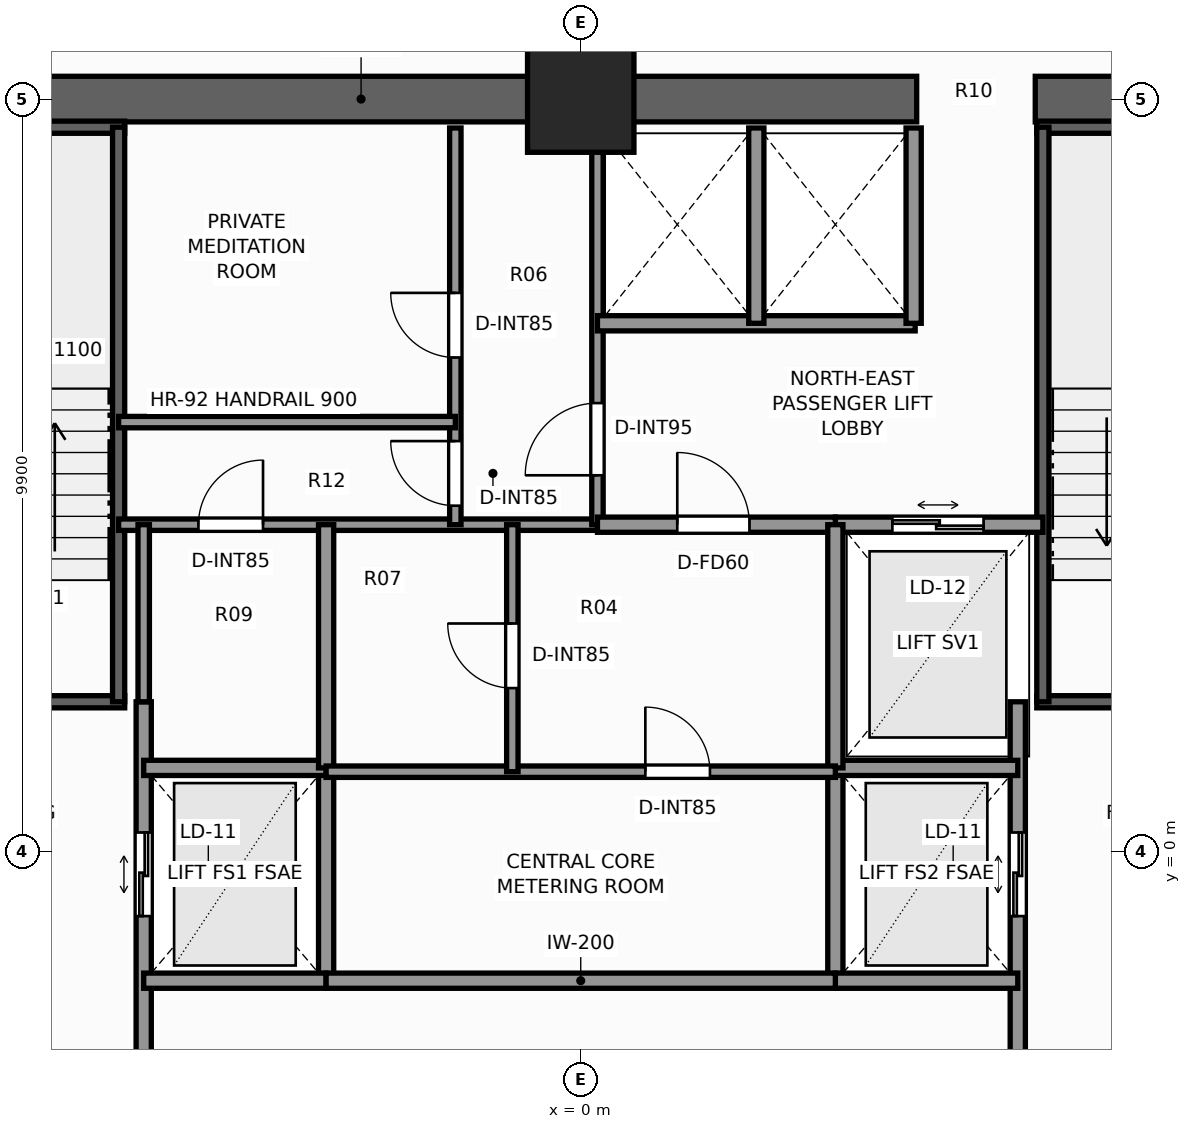
"""IFC4 building model, lengths in metres.
Left out: names, types, materials, properties, quantities, classifications, styles, units other than length and angle.
Written with IfcOpenShell. Run it as: python <this file> out.ifc"""

import sys

from ifc_helpers import new_model, si_unit, direction, frame, frame_2d, origin, origin_2d, place, context, subcontext, project, spatial, rectangle, extrude, element, fill, save


model = new_model("IFC4")
c1 = context("Model", 3, precision=1e-05, world=origin(), true_north=direction((0.0, 1.0)))
c2 = subcontext(c1, "Body", "Model", "MODEL_VIEW")
j1 = project(units=[si_unit("LENGTHUNIT", "METRE"), si_unit("PLANEANGLEUNIT", "RADIAN")], contexts=[c1])
p1 = place(None, origin())
s1 = spatial("IfcSite", under=j1, at=p1, CompositionType="ELEMENT")
p2 = place(p1, origin())
s2 = spatial("IfcBuilding", under=s1, at=p2, CompositionType="ELEMENT")
p3 = place(p2, frame((0.0, 0.0, 82.1)))
s3 = spatial("IfcBuildingStorey", under=s2, at=p3, CompositionType="ELEMENT", Elevation=82.1)
p4 = place(p3, frame((-10.2, 9.9, 0.0), z_axis=(0.0, 0.0, 1.0), x_axis=(1.0, 0.0, 0.0)))
e1 = element("IfcWall", 1, at=p4, inside=s3, PredefinedType="SHEAR", context=c2, shape_type="SweptSolid", body=[
    extrude(rectangle(XDim=14.62, YDim=0.6, at=frame_2d((7.31, 0.0))), origin(), (0.0, 0.0, 1.0), 3.3),
])
p5 = place(p3, frame((5.98, 9.9, 0.0), z_axis=(0.0, 0.0, 1.0), x_axis=(1.0, 0.0, 0.0)))
e2 = element("IfcWall", 2, at=p5, inside=s3, PredefinedType="SHEAR", context=c2, shape_type="SweptSolid", body=[
    extrude(rectangle(XDim=4.22, YDim=0.6, at=frame_2d((2.11, 0.0))), origin(), (0.0, 0.0, 1.0), 3.3),
])
p6 = place(p3, frame((0.0, 9.9, 0.0), z_axis=(0.0, 0.0, 1.0), x_axis=(1.0, 0.0, 0.0)))
e3 = element("IfcColumn", 3, at=p6, inside=s3, PredefinedType="COLUMN", context=c2, shape_type="SweptSolid", body=[
    extrude(rectangle(XDim=1.4, YDim=1.4, at=origin_2d()), origin(), (0.0, 0.0, 1.0), 3.3),
])
p7 = place(p3, frame((-9.52, 1.97, 0.0), z_axis=(0.0, 0.0, 1.0), x_axis=(1.0, 0.0, 0.0)))
e4 = element("IfcWall", 4, at=p7, inside=s3, PredefinedType="SHEAR", context=c2, shape_type="SweptSolid", body=[
    extrude(rectangle(XDim=3.52, YDim=0.16, at=frame_2d((1.76, 0.0))), origin(), (0.0, 0.0, 1.0), 3.3),
])
p8 = place(p7, frame((1.15, 0.0, 0.0)))
e5 = element("IfcOpeningElement", 5, at=p8, cuts=e4, PredefinedType="OPENING", context=c2, shape_type="SweptSolid", body=[
    extrude(rectangle(XDim=1.1, YDim=2.2, at=frame_2d((0.55, 1.1))), frame((0.0, 0.09, 0.0), z_axis=(0.0, -1.0, 0.0), x_axis=(1.0, 0.0, 0.0)), (0.0, 0.0, 1.0), 0.18),
])
p9 = place(p3, frame((-9.52, 9.53, 0.0), z_axis=(0.0, 0.0, 1.0), x_axis=(1.0, 0.0, 0.0)))
e6 = element("IfcWall", 6, at=p9, inside=s3, PredefinedType="SHEAR", context=c2, shape_type="SweptSolid", body=[
    extrude(rectangle(XDim=3.52, YDim=0.16, at=frame_2d((1.76, 0.0))), origin(), (0.0, 0.0, 1.0), 3.3),
])
p10 = place(p3, frame((-6.08, 1.97, 0.0), z_axis=(0.0, 0.0, 1.0), x_axis=(0.0, 1.0, 0.0)))
e7 = element("IfcWall", 7, at=p10, inside=s3, PredefinedType="SHEAR", context=c2, shape_type="SweptSolid", body=[
    extrude(rectangle(XDim=7.56, YDim=0.16, at=frame_2d((3.78, 0.0))), origin(), (0.0, 0.0, 1.0), 3.3),
])
p11 = place(p3, frame((6.0, 1.97, 0.0), z_axis=(0.0, 0.0, 1.0), x_axis=(1.0, 0.0, 0.0)))
e8 = element("IfcWall", 8, at=p11, inside=s3, PredefinedType="SHEAR", context=c2, shape_type="SweptSolid", body=[
    extrude(rectangle(XDim=3.52, YDim=0.16, at=frame_2d((1.76, 0.0))), origin(), (0.0, 0.0, 1.0), 3.3),
])
p12 = place(p11, frame((1.15, 0.0, 0.0)))
e9 = element("IfcOpeningElement", 9, at=p12, cuts=e8, PredefinedType="OPENING", context=c2, shape_type="SweptSolid", body=[
    extrude(rectangle(XDim=1.1, YDim=2.2, at=frame_2d((0.55, 1.1))), frame((0.0, 0.09, 0.0), z_axis=(0.0, -1.0, 0.0), x_axis=(1.0, 0.0, 0.0)), (0.0, 0.0, 1.0), 0.18),
])
p13 = place(p3, frame((6.0, 9.53, 0.0), z_axis=(0.0, 0.0, 1.0), x_axis=(1.0, 0.0, 0.0)))
e10 = element("IfcWall", 10, at=p13, inside=s3, PredefinedType="SHEAR", context=c2, shape_type="SweptSolid", body=[
    extrude(rectangle(XDim=3.52, YDim=0.16, at=frame_2d((1.76, 0.0))), origin(), (0.0, 0.0, 1.0), 3.3),
])
p14 = place(p3, frame((6.08, 1.97, 0.0), z_axis=(0.0, 0.0, 1.0), x_axis=(0.0, 1.0, 0.0)))
e11 = element("IfcWall", 11, at=p14, inside=s3, PredefinedType="SHEAR", context=c2, shape_type="SweptSolid", body=[
    extrude(rectangle(XDim=7.56, YDim=0.16, at=frame_2d((3.78, 0.0))), origin(), (0.0, 0.0, 1.0), 3.3),
])
p15 = place(p3, frame((-5.75, -3.6, 0.0), z_axis=(0.0, 0.0, 1.0), x_axis=(0.0, 1.0, 0.0)))
e12 = element("IfcWall", 12, at=p15, inside=s3, PredefinedType="SOLIDWALL", context=c2, shape_type="SweptSolid", body=[
    extrude(rectangle(XDim=5.57, YDim=0.2, at=frame_2d((2.785, 0.0))), origin(), (0.0, 0.0, 1.0), 3.08),
])
p16 = place(p15, frame((2.75, 0.0, 0.0)))
e13 = element("IfcOpeningElement", 13, at=p16, cuts=e12, PredefinedType="OPENING", context=c2, shape_type="SweptSolid", body=[
    extrude(rectangle(XDim=1.1, YDim=2.2, at=frame_2d((0.55, 1.1))), frame((0.0, 0.11, 0.0), z_axis=(0.0, -1.0, 0.0), x_axis=(1.0, 0.0, 0.0)), (0.0, 0.0, 1.0), 0.22),
])
p17 = place(p3, frame((-3.35, -1.7, 0.0), z_axis=(0.0, 0.0, 1.0), x_axis=(0.0, 1.0, 0.0)))
e14 = element("IfcWall", 14, at=p17, inside=s3, PredefinedType="SOLIDWALL", context=c2, shape_type="SweptSolid", body=[
    extrude(rectangle(XDim=2.8, YDim=0.2, at=frame_2d((1.4, 0.0))), origin(), (0.0, 0.0, 1.0), 3.08),
])
for number, where, z_axis, x_axis in (
    (15, (-5.75, -1.7, 0.0), (0.0, 0.0, 1.0), (1.0, 0.0, 0.0)),
    (16, (-5.75, 1.1, 0.0), (0.0, 0.0, 1.0), (1.0, 0.0, 0.0)),
):
    element("IfcWall", number, at=place(p3, frame(where, z_axis=z_axis, x_axis=x_axis)), inside=s3, PredefinedType="SOLIDWALL", context=c2, shape_type="SweptSolid", body=[
        extrude(rectangle(XDim=2.4, YDim=0.2, at=frame_2d((1.2, 0.0))), origin(), (0.0, 0.0, 1.0), 3.08),
    ])
p18 = place(p3, frame((5.75, -3.6, 0.0), z_axis=(0.0, 0.0, 1.0), x_axis=(0.0, 1.0, 0.0)))
e17 = element("IfcWall", 17, at=p18, inside=s3, PredefinedType="SOLIDWALL", context=c2, shape_type="SweptSolid", body=[
    extrude(rectangle(XDim=5.57, YDim=0.2, at=frame_2d((2.785, 0.0))), origin(), (0.0, 0.0, 1.0), 3.08),
])
p19 = place(p18, frame((2.75, 0.0, 0.0)))
e18 = element("IfcOpeningElement", 18, at=p19, cuts=e17, PredefinedType="OPENING", context=c2, shape_type="SweptSolid", body=[
    extrude(rectangle(XDim=1.1, YDim=2.2, at=frame_2d((0.55, 1.1))), frame((0.0, 0.11, 0.0), z_axis=(0.0, -1.0, 0.0), x_axis=(1.0, 0.0, 0.0)), (0.0, 0.0, 1.0), 0.22),
])
p20 = place(p3, frame((3.35, -1.7, 0.0), z_axis=(0.0, 0.0, 1.0), x_axis=(0.0, 1.0, 0.0)))
e19 = element("IfcWall", 19, at=p20, inside=s3, PredefinedType="SOLIDWALL", context=c2, shape_type="SweptSolid", body=[
    extrude(rectangle(XDim=2.8, YDim=0.2, at=frame_2d((1.4, 0.0))), origin(), (0.0, 0.0, 1.0), 3.08),
])
for number, where, z_axis, x_axis in (
    (20, (3.35, -1.7, 0.0), (0.0, 0.0, 1.0), (1.0, 0.0, 0.0)),
    (21, (3.35, 1.1, 0.0), (0.0, 0.0, 1.0), (1.0, 0.0, 0.0)),
):
    element("IfcWall", number, at=place(p3, frame(where, z_axis=z_axis, x_axis=x_axis)), inside=s3, PredefinedType="SOLIDWALL", context=c2, shape_type="SweptSolid", body=[
        extrude(rectangle(XDim=2.4, YDim=0.2, at=frame_2d((1.2, 0.0))), origin(), (0.0, 0.0, 1.0), 3.08),
    ])
p21 = place(p3, frame((3.35, 4.3, 0.0), z_axis=(0.0, 0.0, 1.0), x_axis=(1.0, 0.0, 0.0)))
e22 = element("IfcWall", 22, at=p21, inside=s3, PredefinedType="SOLIDWALL", context=c2, shape_type="SweptSolid", body=[
    extrude(rectangle(XDim=2.73, YDim=0.2, at=frame_2d((1.365, 0.0))), origin(), (0.0, 0.0, 1.0), 3.08),
])
p22 = place(p21, frame((0.75, 0.0, 0.0)))
e23 = element("IfcOpeningElement", 23, at=p22, cuts=e22, PredefinedType="OPENING", context=c2, shape_type="SweptSolid", body=[
    extrude(rectangle(XDim=1.2, YDim=2.25, at=frame_2d((0.6, 1.125))), frame((0.0, 0.11, 0.0), z_axis=(0.0, -1.0, 0.0), x_axis=(1.0, 0.0, 0.0)), (0.0, 0.0, 1.0), 0.22),
])
p23 = place(p3, frame((-6.08, 4.3, 0.0), z_axis=(0.0, 0.0, 1.0), x_axis=(1.0, 0.0, 0.0)))
e24 = element("IfcWall", 24, at=p23, inside=s3, PredefinedType="PARTITIONING", context=c2, shape_type="SweptSolid", body=[
    extrude(rectangle(XDim=6.3, YDim=0.15, at=frame_2d((3.15, 0.0))), origin(), (0.0, 0.0, 1.0), 3.08),
])
p24 = place(p23, frame((1.05, 0.0, 0.0)))
e25 = element("IfcOpeningElement", 25, at=p24, cuts=e24, PredefinedType="OPENING", context=c2, shape_type="SweptSolid", body=[
    extrude(rectangle(XDim=0.85, YDim=2.03, at=frame_2d((0.425, 1.015))), frame((0.0, 0.085, 0.0), z_axis=(0.0, -1.0, 0.0), x_axis=(1.0, 0.0, 0.0)), (0.0, 0.0, 1.0), 0.17),
])
p25 = place(p3, frame((0.22, 4.3, 0.0), z_axis=(0.0, 0.0, 1.0), x_axis=(0.0, 1.0, 0.0)))
e26 = element("IfcWall", 26, at=p25, inside=s3, PredefinedType="PARTITIONING", context=c2, shape_type="SweptSolid", body=[
    extrude(rectangle(XDim=5.22, YDim=0.15, at=frame_2d((2.61, 0.0))), origin(), (0.0, 0.0, 1.0), 3.08),
])
p26 = place(p25, frame((0.65, 0.0, 0.0)))
e27 = element("IfcOpeningElement", 27, at=p26, cuts=e26, PredefinedType="OPENING", context=c2, shape_type="SweptSolid", body=[
    extrude(rectangle(XDim=0.95, YDim=2.06, at=frame_2d((0.475, 1.03))), frame((0.0, 0.085, 0.0), z_axis=(0.0, -1.0, 0.0), x_axis=(1.0, 0.0, 0.0)), (0.0, 0.0, 1.0), 0.17),
])
p27 = place(p3, frame((-1.65, 4.3, 0.0), z_axis=(0.0, 0.0, 1.0), x_axis=(0.0, 1.0, 0.0)))
e28 = element("IfcWall", 28, at=p27, inside=s3, PredefinedType="PARTITIONING", context=c2, shape_type="SweptSolid", body=[
    extrude(rectangle(XDim=5.22, YDim=0.15, at=frame_2d((2.61, 0.0))), origin(), (0.0, 0.0, 1.0), 3.08),
])
p28 = place(p27, frame((2.2, 0.0, 0.0)))
e29 = element("IfcOpeningElement", 29, at=p28, cuts=e28, PredefinedType="OPENING", context=c2, shape_type="SweptSolid", body=[
    extrude(rectangle(XDim=0.85, YDim=2.03, at=frame_2d((0.425, 1.015))), frame((0.0, 0.085, 0.0), z_axis=(0.0, -1.0, 0.0), x_axis=(1.0, 0.0, 0.0)), (0.0, 0.0, 1.0), 0.17),
])
p29 = place(p27, frame((0.25, 0.0, 0.0)))
e30 = element("IfcOpeningElement", 30, at=p29, cuts=e28, PredefinedType="OPENING", context=c2, shape_type="SweptSolid", body=[
    extrude(rectangle(XDim=0.85, YDim=2.03, at=frame_2d((0.425, 1.015))), frame((0.0, 0.085, 0.0), z_axis=(0.0, -1.0, 0.0), x_axis=(1.0, 0.0, 0.0)), (0.0, 0.0, 1.0), 0.17),
])
p30 = place(p3, frame((-6.08, 5.65, 0.0), z_axis=(0.0, 0.0, 1.0), x_axis=(1.0, 0.0, 0.0)))
e31 = element("IfcWall", 31, at=p30, inside=s3, PredefinedType="PARTITIONING", context=c2, shape_type="SweptSolid", body=[
    extrude(rectangle(XDim=4.43, YDim=0.15, at=frame_2d((2.215, 0.0))), origin(), (0.0, 0.0, 1.0), 3.08),
])
p31 = place(p3, frame((0.22, 6.95, 0.0), z_axis=(0.0, 0.0, 1.0), x_axis=(1.0, 0.0, 0.0)))
e32 = element("IfcWall", 32, at=p31, inside=s3, PredefinedType="SOLIDWALL", context=c2, shape_type="SweptSolid", body=[
    extrude(rectangle(XDim=4.18, YDim=0.2, at=frame_2d((2.09, 0.0))), origin(), (0.0, 0.0, 1.0), 3.08),
])
for number, where, z_axis, x_axis in (
    (33, (4.38, 6.95, 0.0), (0.0, 0.0, 1.0), (0.0, 1.0, 0.0)),
    (34, (2.31, 6.95, 0.0), (0.0, 0.0, 1.0), (0.0, 1.0, 0.0)),
):
    element("IfcWall", number, at=place(p3, frame(where, z_axis=z_axis, x_axis=x_axis)), inside=s3, PredefinedType="SOLIDWALL", context=c2, shape_type="SweptSolid", body=[
        extrude(rectangle(XDim=2.57, YDim=0.2, at=frame_2d((1.285, 0.0))), origin(), (0.0, 0.0, 1.0), 3.08),
    ])
p32 = place(p3, frame((0.22, 4.3, 0.0), z_axis=(0.0, 0.0, 1.0), x_axis=(1.0, 0.0, 0.0)))
e35 = element("IfcWall", 35, at=p32, inside=s3, PredefinedType="SOLIDWALL", context=c2, shape_type="SweptSolid", body=[
    extrude(rectangle(XDim=3.13, YDim=0.2, at=frame_2d((1.565, 0.0))), origin(), (0.0, 0.0, 1.0), 3.08),
])
p33 = place(p32, frame((1.05, 0.0, 0.0)))
e36 = element("IfcOpeningElement", 36, at=p33, cuts=e35, PredefinedType="OPENING", context=c2, shape_type="SweptSolid", body=[
    extrude(rectangle(XDim=0.95, YDim=2.06, at=frame_2d((0.475, 1.03))), frame((0.0, 0.11, 0.0), z_axis=(0.0, -1.0, 0.0), x_axis=(1.0, 0.0, 0.0)), (0.0, 0.0, 1.0), 0.22),
])
p34 = place(p3, frame((-3.35, -1.7, 0.0), z_axis=(0.0, 0.0, 1.0), x_axis=(1.0, 0.0, 0.0)))
e37 = element("IfcWall", 37, at=p34, inside=s3, PredefinedType="SOLIDWALL", context=c2, shape_type="SweptSolid", body=[
    extrude(rectangle(XDim=6.7, YDim=0.2, at=frame_2d((3.35, 0.0))), origin(), (0.0, 0.0, 1.0), 3.08),
])
for number, where, z_axis, x_axis in (
    (38, (-3.35, 1.1, 0.0), (0.0, 0.0, 1.0), (0.0, 1.0, 0.0)),
    (39, (3.35, 1.1, 0.0), (0.0, 0.0, 1.0), (0.0, 1.0, 0.0)),
):
    element("IfcWall", number, at=place(p3, frame(where, z_axis=z_axis, x_axis=x_axis)), inside=s3, PredefinedType="SOLIDWALL", context=c2, shape_type="SweptSolid", body=[
        extrude(rectangle(XDim=3.2, YDim=0.2, at=frame_2d((1.6, 0.0))), origin(), (0.0, 0.0, 1.0), 3.08),
    ])
p35 = place(p3, frame((-3.35, 1.05, 0.0), z_axis=(0.0, 0.0, 1.0), x_axis=(1.0, 0.0, 0.0)))
e40 = element("IfcWall", 40, at=p35, inside=s3, PredefinedType="PARTITIONING", context=c2, shape_type="SweptSolid", body=[
    extrude(rectangle(XDim=6.7, YDim=0.15, at=frame_2d((3.35, 0.0))), origin(), (0.0, 0.0, 1.0), 3.08),
])
p36 = place(p35, frame((4.2, 0.0, 0.0)))
e41 = element("IfcOpeningElement", 41, at=p36, cuts=e40, PredefinedType="OPENING", context=c2, shape_type="SweptSolid", body=[
    extrude(rectangle(XDim=0.85, YDim=2.03, at=frame_2d((0.425, 1.015))), frame((0.0, 0.085, 0.0), z_axis=(0.0, -1.0, 0.0), x_axis=(1.0, 0.0, 0.0)), (0.0, 0.0, 1.0), 0.17),
])
p37 = place(p3, frame((-0.9, 1.05, 0.0), z_axis=(0.0, 0.0, 1.0), x_axis=(0.0, 1.0, 0.0)))
e42 = element("IfcWall", 42, at=p37, inside=s3, PredefinedType="PARTITIONING", context=c2, shape_type="SweptSolid", body=[
    extrude(rectangle(XDim=3.25, YDim=0.15, at=frame_2d((1.625, 0.0))), origin(), (0.0, 0.0, 1.0), 3.08),
])
p38 = place(p37, frame((1.1, 0.0, 0.0)))
e43 = element("IfcOpeningElement", 43, at=p38, cuts=e42, PredefinedType="OPENING", context=c2, shape_type="SweptSolid", body=[
    extrude(rectangle(XDim=0.85, YDim=2.03, at=frame_2d((0.425, 1.015))), frame((0.0, 0.085, 0.0), z_axis=(0.0, -1.0, 0.0), x_axis=(1.0, 0.0, 0.0)), (0.0, 0.0, 1.0), 0.17),
])
p39 = place(p3, frame((-5.75, 1.97, 0.0), z_axis=(0.0, 0.0, 1.0), x_axis=(0.0, 1.0, 0.0)))
e44 = element("IfcWall", 44, at=p39, inside=s3, PredefinedType="PARTITIONING", context=c2, shape_type="SweptSolid", body=[
    extrude(rectangle(XDim=2.33, YDim=0.15, at=frame_2d((1.165, 0.0))), origin(), (0.0, 0.0, 1.0), 3.08),
])
p40 = place(p16, origin())
e45 = element("IfcDoor", 45, at=p40, inside=s3, OperationType="DOUBLE_DOOR_SLIDING", PredefinedType="DOOR", context=c2, shape_type="SweptSolid", body=[
    extrude(rectangle(XDim=1.1, YDim=2.2, at=frame_2d((0.55, 1.1))), frame((0.0, 0.025, 0.0), z_axis=(0.0, -1.0, 0.0), x_axis=(1.0, 0.0, 0.0)), (0.0, 0.0, 1.0), 0.05),
])
fill(e13, e45)
p41 = place(p19, origin())
e46 = element("IfcDoor", 46, at=p41, inside=s3, OperationType="DOUBLE_DOOR_SLIDING", PredefinedType="DOOR", context=c2, shape_type="SweptSolid", body=[
    extrude(rectangle(XDim=1.1, YDim=2.2, at=frame_2d((0.55, 1.1))), frame((0.0, 0.025, 0.0), z_axis=(0.0, -1.0, 0.0), x_axis=(1.0, 0.0, 0.0)), (0.0, 0.0, 1.0), 0.05),
])
fill(e18, e46)
p42 = place(p22, origin())
e47 = element("IfcDoor", 47, at=p42, inside=s3, OperationType="DOUBLE_DOOR_SLIDING", PredefinedType="DOOR", context=c2, shape_type="SweptSolid", body=[
    extrude(rectangle(XDim=1.2, YDim=2.25, at=frame_2d((0.6, 1.125))), frame((0.0, 0.025, 0.0), z_axis=(0.0, -1.0, 0.0), x_axis=(1.0, 0.0, 0.0)), (0.0, 0.0, 1.0), 0.05),
])
fill(e23, e47)
p43 = place(p26, origin())
e48 = element("IfcDoor", 48, at=p43, inside=s3, OperationType="SINGLE_SWING_LEFT", PredefinedType="DOOR", context=c2, shape_type="SweptSolid", body=[
    extrude(rectangle(XDim=0.95, YDim=2.06, at=frame_2d((0.475, 1.03))), frame((0.0, 0.025, 0.0), z_axis=(0.0, -1.0, 0.0), x_axis=(1.0, 0.0, 0.0)), (0.0, 0.0, 1.0), 0.05),
])
fill(e27, e48)
p44 = place(p28, origin())
e49 = element("IfcDoor", 49, at=p44, inside=s3, OperationType="SINGLE_SWING_RIGHT", PredefinedType="DOOR", context=c2, shape_type="SweptSolid", body=[
    extrude(rectangle(XDim=0.85, YDim=2.03, at=frame_2d((0.425, 1.015))), frame((0.0, 0.025, 0.0), z_axis=(0.0, -1.0, 0.0), x_axis=(1.0, 0.0, 0.0)), (0.0, 0.0, 1.0), 0.05),
])
fill(e29, e49)
p45 = place(p29, origin())
e50 = element("IfcDoor", 50, at=p45, inside=s3, OperationType="SINGLE_SWING_RIGHT", PredefinedType="DOOR", context=c2, shape_type="SweptSolid", body=[
    extrude(rectangle(XDim=0.85, YDim=2.03, at=frame_2d((0.425, 1.015))), frame((0.0, 0.025, 0.0), z_axis=(0.0, -1.0, 0.0), x_axis=(1.0, 0.0, 0.0)), (0.0, 0.0, 1.0), 0.05),
])
fill(e30, e50)
p46 = place(p33, origin())
e51 = element("IfcDoor", 51, at=p46, inside=s3, OperationType="SINGLE_SWING_LEFT", PredefinedType="DOOR", context=c2, shape_type="SweptSolid", body=[
    extrude(rectangle(XDim=0.95, YDim=2.06, at=frame_2d((0.475, 1.03))), frame((0.0, 0.025, 0.0), z_axis=(0.0, -1.0, 0.0), x_axis=(1.0, 0.0, 0.0)), (0.0, 0.0, 1.0), 0.05),
])
fill(e36, e51)
p47 = place(p36, origin())
e52 = element("IfcDoor", 52, at=p47, inside=s3, OperationType="SINGLE_SWING_LEFT", PredefinedType="DOOR", context=c2, shape_type="SweptSolid", body=[
    extrude(rectangle(XDim=0.85, YDim=2.03, at=frame_2d((0.425, 1.015))), frame((0.0, 0.025, 0.0), z_axis=(0.0, -1.0, 0.0), x_axis=(1.0, 0.0, 0.0)), (0.0, 0.0, 1.0), 0.05),
])
fill(e41, e52)
p48 = place(p38, origin())
e53 = element("IfcDoor", 53, at=p48, inside=s3, OperationType="SINGLE_SWING_RIGHT", PredefinedType="DOOR", context=c2, shape_type="SweptSolid", body=[
    extrude(rectangle(XDim=0.85, YDim=2.03, at=frame_2d((0.425, 1.015))), frame((0.0, 0.025, 0.0), z_axis=(0.0, -1.0, 0.0), x_axis=(1.0, 0.0, 0.0)), (0.0, 0.0, 1.0), 0.05),
])
fill(e43, e53)
p49 = place(p24, origin())
e54 = element("IfcDoor", 54, at=p49, inside=s3, OperationType="SINGLE_SWING_RIGHT", PredefinedType="DOOR", context=c2, shape_type="SweptSolid", body=[
    extrude(rectangle(XDim=0.85, YDim=2.03, at=frame_2d((0.425, 1.015))), frame((0.0, 0.025, 0.0), z_axis=(0.0, -1.0, 0.0), x_axis=(1.0, 0.0, 0.0)), (0.0, 0.0, 1.0), 0.05),
])
fill(e25, e54)
save(model, sys.argv[1])
